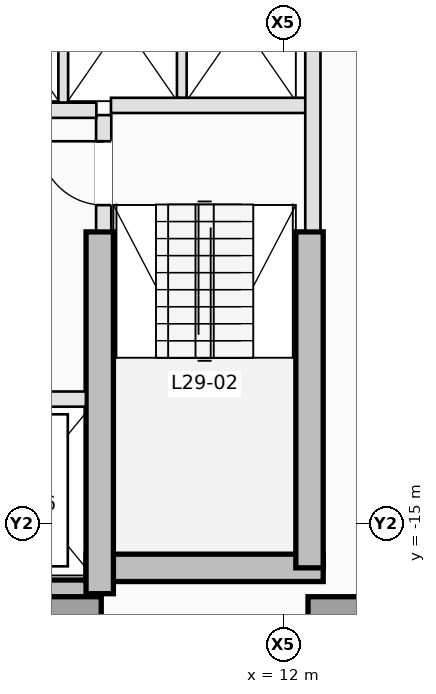
"""IFC4 building model, lengths in metres.
Left out: names, types, materials, properties, quantities, classifications, styles, units other than length and angle.
Written with IfcOpenShell. Run it as: python <this file> out.ifc"""

import sys

from ifc_helpers import new_model, si_unit, direction, frame, frame_2d, origin, origin_2d, place, context, subcontext, project, spatial, rectangle, extrude, element, fill, save


model = new_model("IFC4")
c1 = context("Model", 3, precision=1e-05, world=origin(), true_north=direction((0.0, 1.0)))
c2 = subcontext(c1, "Body", "Model", "MODEL_VIEW")
j1 = project(units=[si_unit("LENGTHUNIT", "METRE"), si_unit("PLANEANGLEUNIT", "RADIAN")], contexts=[c1])
p1 = place(None, origin())
s1 = spatial("IfcSite", under=j1, at=p1, CompositionType="ELEMENT")
p2 = place(p1, origin())
s2 = spatial("IfcBuilding", under=s1, at=p2, CompositionType="ELEMENT")
p3 = place(p2, frame((0.0, 0.0, 109.0)))
s3 = spatial("IfcBuildingStorey", under=s2, at=p3, CompositionType="ELEMENT", Elevation=109.0)
p4 = place(p3, frame((3.75, -16.15, 0.0), z_axis=(0.0, 0.0, 1.0), x_axis=(1.0, 0.0, 0.0)))
e1 = element("IfcWall", 1, at=p4, inside=s3, PredefinedType="SHEAR", context=c2, shape_type="SweptSolid", body=[
    extrude(rectangle(XDim=5.225, YDim=0.45, at=frame_2d((2.613, 0.0))), origin(), (0.0, 0.0, 1.0), 3.5),
])
p5 = place(p3, frame((8.75, -15.725, 0.0), z_axis=(0.0, 0.0, 1.0), x_axis=(1.0, 0.0, 0.0)))
e2 = element("IfcWall", 2, at=p5, inside=s3, PredefinedType="SHEAR", context=c2, shape_type="SweptSolid", body=[
    extrude(rectangle(XDim=3.9, YDim=0.45, at=frame_2d((1.95, 0.0))), origin(), (0.0, 0.0, 1.0), 3.5),
])
p6 = place(p3, frame((12.425, -15.725, 0.0), z_axis=(0.0, 0.0, 1.0), x_axis=(0.0, 1.0, 0.0)))
e3 = element("IfcWall", 3, at=p6, inside=s3, PredefinedType="SHEAR", context=c2, shape_type="SweptSolid", body=[
    extrude(rectangle(XDim=5.525, YDim=0.45, at=frame_2d((2.763, 0.0))), origin(), (0.0, 0.0, 1.0), 3.5),
])
p7 = place(p3, frame((8.975, -16.15, 0.0), z_axis=(0.0, 0.0, 1.0), x_axis=(0.0, 1.0, 0.0)))
e4 = element("IfcWall", 4, at=p7, inside=s3, PredefinedType="SHEAR", context=c2, shape_type="SweptSolid", body=[
    extrude(rectangle(XDim=5.95, YDim=0.45, at=frame_2d((2.975, 0.0))), origin(), (0.0, 0.0, 1.0), 3.5),
])
for number, where, z_axis, x_axis in (
    (5, (8.45, -16.75, 0.0), (0.0, 0.0, 1.0), (1.0, 0.0, 0.0)),
    (6, (12.95, -16.75, 0.0), (0.0, 0.0, 1.0), (1.0, 0.0, 0.0)),
):
    element("IfcColumn", number, at=place(p3, frame(where, z_axis=z_axis, x_axis=x_axis)), inside=s3, PredefinedType="COLUMN", context=c2, shape_type="SweptSolid", body=[
        extrude(rectangle(XDim=1.1, YDim=1.1, at=origin_2d()), origin(), (0.0, 0.0, 1.0), 3.5),
    ])
p8 = place(p3, frame((9.04, -10.18, 0.0), z_axis=(0.0, 0.0, 1.0), x_axis=(0.0, 1.0, 0.0)))
e7 = element("IfcWall", 7, at=p8, inside=s3, PredefinedType="PARTITIONING", context=c2, shape_type="SweptSolid", body=[
    extrude(rectangle(XDim=1.9, YDim=0.25, at=frame_2d((0.95, 0.0))), origin(), (0.0, 0.0, 1.0), 3.25),
])
p9 = place(p8, frame((0.42, 0.0, 0.0)))
e8 = element("IfcOpeningElement", 8, at=p9, cuts=e7, PredefinedType="OPENING", context=c2, shape_type="SweptSolid", body=[
    extrude(rectangle(XDim=1.05, YDim=2.15, at=frame_2d((0.525, 1.075))), frame((0.0, 0.135, 0.0), z_axis=(0.0, -1.0, 0.0), x_axis=(1.0, 0.0, 0.0)), (0.0, 0.0, 1.0), 0.27),
])
p10 = place(p3, frame((9.16, -8.12, 0.0), z_axis=(0.0, 0.0, 1.0), x_axis=(1.0, 0.0, 0.0)))
e9 = element("IfcWall", 9, at=p10, inside=s3, PredefinedType="PARTITIONING", context=c2, shape_type="SweptSolid", body=[
    extrude(rectangle(XDim=3.22, YDim=0.25, at=frame_2d((1.61, 0.0))), origin(), (0.0, 0.0, 1.0), 3.25),
])
p11 = place(p3, frame((12.48, -10.18, 0.0), z_axis=(0.0, 0.0, 1.0), x_axis=(0.0, 1.0, 0.0)))
e10 = element("IfcWall", 10, at=p11, inside=s3, PredefinedType="PARTITIONING", context=c2, shape_type="SweptSolid", body=[
    extrude(rectangle(XDim=4.828, YDim=0.25, at=frame_2d((2.414, 0.0))), origin(), (0.0, 0.0, 1.0), 3.25),
])
p12 = place(p3, frame((3.68, -12.95, 0.0), z_axis=(0.0, 0.0, 1.0), x_axis=(1.0, 0.0, 0.0)))
e11 = element("IfcWall", 11, at=p12, inside=s3, PredefinedType="PARTITIONING", context=c2, shape_type="SweptSolid", body=[
    extrude(rectangle(XDim=5.068, YDim=0.25, at=frame_2d((2.534, 0.0))), origin(), (0.0, 0.0, 1.0), 3.25),
])
p13 = place(p12, frame((3.32, 0.0, 0.0)))
e12 = element("IfcOpeningElement", 12, at=p13, cuts=e11, PredefinedType="OPENING", context=c2, shape_type="SweptSolid", body=[
    extrude(rectangle(XDim=1.1, YDim=2.15, at=frame_2d((0.55, 1.075))), frame((0.0, 0.135, 0.0), z_axis=(0.0, -1.0, 0.0), x_axis=(1.0, 0.0, 0.0)), (0.0, 0.0, 1.0), 0.27),
])
p14 = place(p12, frame((0.67, 0.0, 0.0)))
e13 = element("IfcOpeningElement", 13, at=p14, cuts=e11, PredefinedType="OPENING", context=c2, shape_type="SweptSolid", body=[
    extrude(rectangle(XDim=1.2, YDim=2.15, at=frame_2d((0.6, 1.075))), frame((0.0, 0.135, 0.0), z_axis=(0.0, -1.0, 0.0), x_axis=(1.0, 0.0, 0.0)), (0.0, 0.0, 1.0), 0.27),
])
p15 = place(p3, frame((3.68, -8.2, 0.0), z_axis=(0.0, 0.0, 1.0), x_axis=(1.0, 0.0, 0.0)))
e14 = element("IfcWall", 14, at=p15, inside=s3, PredefinedType="PARTITIONING", context=c2, shape_type="SweptSolid", body=[
    extrude(rectangle(XDim=5.24, YDim=0.25, at=frame_2d((2.62, 0.0))), origin(), (0.0, 0.0, 1.0), 3.25),
])
p16 = place(p3, frame((8.375, -8.073, 0.0), z_axis=(0.0, 0.0, 1.0), x_axis=(0.0, 1.0, 0.0)))
e15 = element("IfcWall", 15, at=p16, inside=s3, PredefinedType="PARTITIONING", context=c2, shape_type="SweptSolid", body=[
    extrude(rectangle(XDim=2.733, YDim=0.16, at=frame_2d((1.366, 0.0))), origin(), (0.0, 0.0, 1.0), 3.25),
])
p17 = place(p3, frame((10.325, -7.993, 0.0), z_axis=(0.0, 0.0, 1.0), x_axis=(0.0, 1.0, 0.0)))
e16 = element("IfcWall", 16, at=p17, inside=s3, PredefinedType="PARTITIONING", context=c2, shape_type="SweptSolid", body=[
    extrude(rectangle(XDim=2.653, YDim=0.16, at=frame_2d((1.326, 0.0))), origin(), (0.0, 0.0, 1.0), 3.25),
])
p18 = place(p9, origin())
e17 = element("IfcDoor", 17, at=p18, inside=s3, OperationType="SINGLE_SWING_RIGHT", PredefinedType="DOOR", context=c2, shape_type="SweptSolid", body=[
    extrude(rectangle(XDim=1.05, YDim=2.15, at=frame_2d((0.525, 1.075))), frame((0.0, 0.025, 0.0), z_axis=(0.0, -1.0, 0.0), x_axis=(1.0, 0.0, 0.0)), (0.0, 0.0, 1.0), 0.05),
])
fill(e8, e17)
save(model, sys.argv[1])
